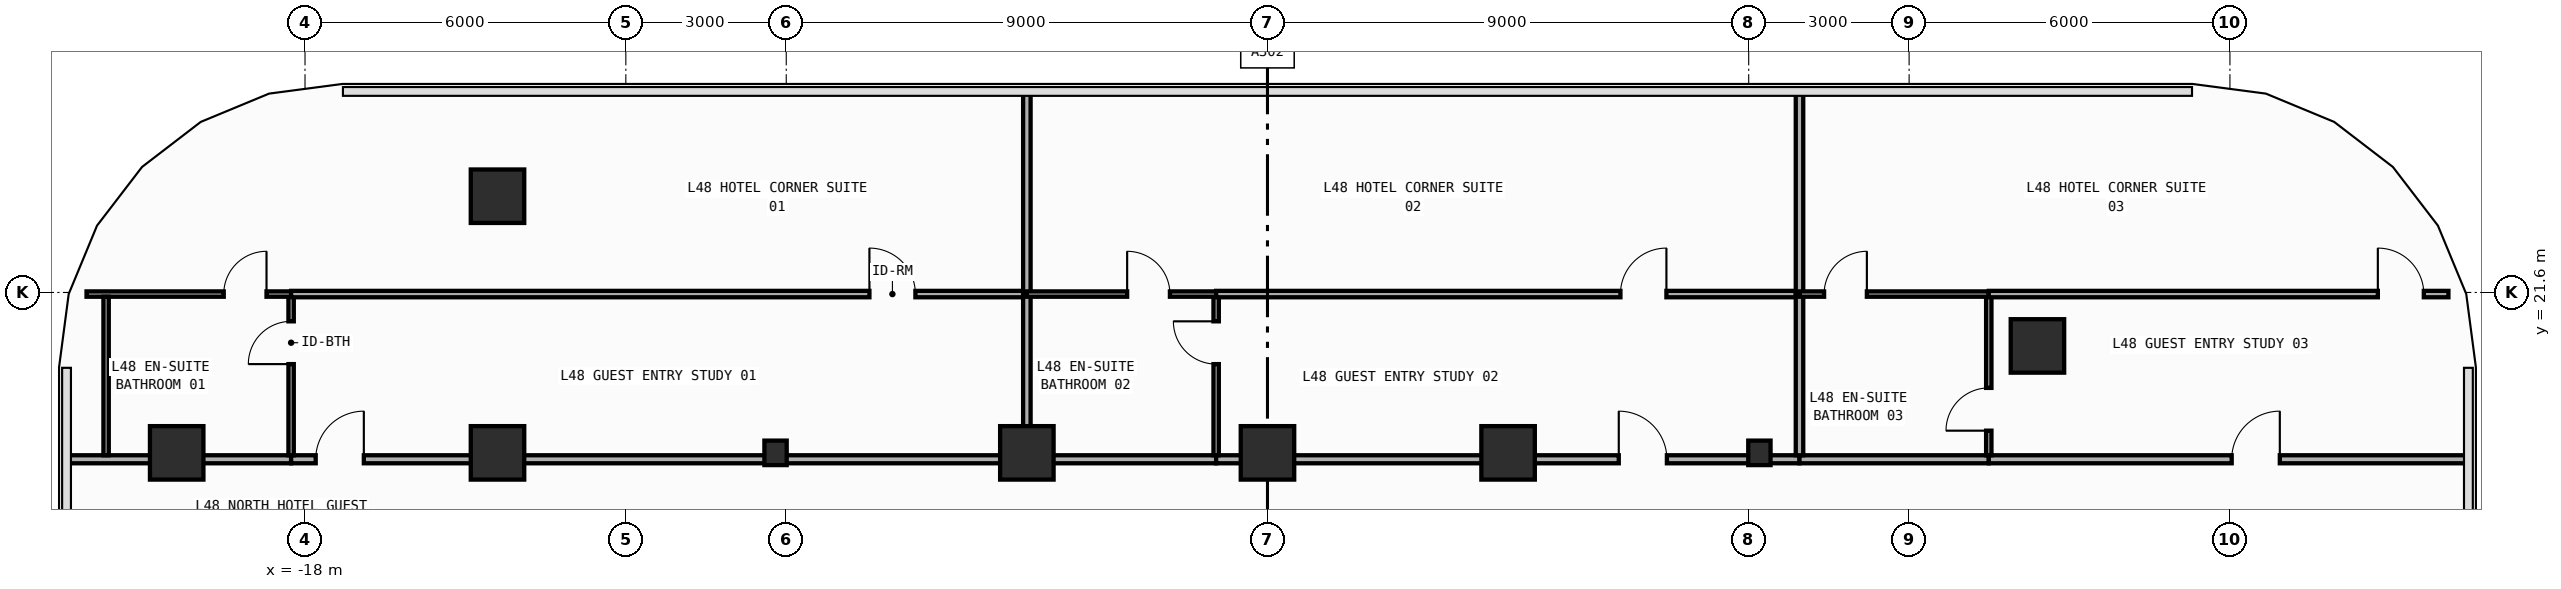
"""IFC4 building model, lengths in metres.
Left out: names, types, materials, properties, quantities, classifications, styles, units other than length and angle.
Written with IfcOpenShell. Run it as: python <this file> out.ifc"""

import sys

from ifc_helpers import new_model, si_unit, direction, frame, frame_2d, origin, origin_2d, place, context, subcontext, project, spatial, rectangle, i_section, extrude, element, fill, save


model = new_model("IFC4")
c1 = context("Model", 3, precision=1e-05, world=origin(), true_north=direction((0.0, 1.0)))
c2 = subcontext(c1, "Body", "Model", "MODEL_VIEW")
j1 = project(units=[si_unit("LENGTHUNIT", "METRE"), si_unit("PLANEANGLEUNIT", "RADIAN")], contexts=[c1])
p1 = place(None, origin())
s1 = spatial("IfcSite", under=j1, at=p1, CompositionType="ELEMENT")
p2 = place(p1, origin())
s2 = spatial("IfcBuilding", under=s1, at=p2, CompositionType="ELEMENT")
p3 = place(p2, frame((0.0, 0.0, 206.8)))
s3 = spatial("IfcBuildingStorey", under=s2, at=p3, CompositionType="ELEMENT", Elevation=206.8)
for number, where, z_axis, x_axis in (
    (1, (-9.2, 18.6, 0.0), (0.0, 0.0, 1.0), (1.0, 0.0, 0.0)),
    (2, (9.2, 18.6, 0.0), (0.0, 0.0, 1.0), (1.0, 0.0, 0.0)),
):
    element("IfcColumn", number, at=place(p3, frame(where, z_axis=z_axis, x_axis=x_axis)), inside=s3, PredefinedType="COLUMN", context=c2, shape_type="SweptSolid", body=[
        extrude(i_section(OverallWidth=0.417, OverallDepth=0.458, WebThickness=0.03, FlangeThickness=0.05, FilletRadius=0.022, at=origin_2d()), origin(), (0.0, 0.0, 1.0), 3.8),
    ])
for number, where, z_axis, x_axis in (
    (3, (-20.4, 18.6, 0.0), (0.0, 0.0, 1.0), (1.0, 0.0, 0.0)),
    (4, (-14.4, 18.6, 0.0), (0.0, 0.0, 1.0), (1.0, 0.0, 0.0)),
    (5, (-4.5, 18.6, 0.0), (0.0, 0.0, 1.0), (1.0, 0.0, 0.0)),
    (6, (0.0, 18.6, 0.0), (0.0, 0.0, 1.0), (1.0, 0.0, 0.0)),
    (7, (4.5, 18.6, 0.0), (0.0, 0.0, 1.0), (1.0, 0.0, 0.0)),
    (8, (-14.4, 23.4, 0.0), (0.0, 0.0, 1.0), (1.0, 0.0, 0.0)),
    (9, (14.4, 20.6, 0.0), (0.0, 0.0, 1.0), (1.0, 0.0, 0.0)),
):
    element("IfcColumn", number, at=place(p3, frame(where, z_axis=z_axis, x_axis=x_axis)), inside=s3, PredefinedType="COLUMN", context=c2, shape_type="SweptSolid", body=[
        extrude(rectangle(XDim=1.0, YDim=1.0, at=origin_2d()), origin(), (0.0, 0.0, 1.0), 3.8),
    ])
p4 = place(p3, frame((-22.455, 18.48, 0.0), z_axis=(0.0, 0.0, 1.0), x_axis=(1.0, 0.0, 0.0)))
e10 = element("IfcWall", 10, at=p4, inside=s3, PredefinedType="PARTITIONING", context=c2, shape_type="SweptSolid", body=[
    extrude(rectangle(XDim=4.195, YDim=0.15, at=frame_2d((2.098, 0.0))), origin(), (0.0, 0.0, 1.0), 2.952),
])
p5 = place(p3, frame((-18.26, 18.48, 0.0), z_axis=(0.0, 0.0, 1.0), x_axis=(1.0, 0.0, 0.0)))
e11 = element("IfcWall", 11, at=p5, inside=s3, PredefinedType="PARTITIONING", context=c2, shape_type="SweptSolid", body=[
    extrude(rectangle(XDim=13.76, YDim=0.15, at=frame_2d((6.88, 0.0))), origin(), (0.0, 0.0, 1.0), 2.952),
])
p6 = place(p5, frame((0.46, 0.0, 0.0)))
e12 = element("IfcOpeningElement", 12, at=p6, cuts=e11, PredefinedType="OPENING", context=c2, shape_type="SweptSolid", body=[
    extrude(rectangle(XDim=0.9, YDim=2.15, at=frame_2d((0.45, 1.075))), frame((0.0, 0.085, 0.0), z_axis=(0.0, -1.0, 0.0), x_axis=(1.0, 0.0, 0.0)), (0.0, 0.0, 1.0), 0.17),
])
p7 = place(p3, frame((-4.5, 18.48, 0.0), z_axis=(0.0, 0.0, 1.0), x_axis=(1.0, 0.0, 0.0)))
e13 = element("IfcWall", 13, at=p7, inside=s3, PredefinedType="PARTITIONING", context=c2, shape_type="SweptSolid", body=[
    extrude(rectangle(XDim=3.54, YDim=0.15, at=frame_2d((1.77, 0.0))), origin(), (0.0, 0.0, 1.0), 2.952),
])
p8 = place(p3, frame((-0.96, 18.48, 0.0), z_axis=(0.0, 0.0, 1.0), x_axis=(1.0, 0.0, 0.0)))
e14 = element("IfcWall", 14, at=p8, inside=s3, PredefinedType="PARTITIONING", context=c2, shape_type="SweptSolid", body=[
    extrude(rectangle(XDim=10.91, YDim=0.15, at=frame_2d((5.455, 0.0))), origin(), (0.0, 0.0, 1.0), 2.952),
])
p9 = place(p8, frame((7.53, 0.0, 0.0)))
e15 = element("IfcOpeningElement", 15, at=p9, cuts=e14, PredefinedType="OPENING", context=c2, shape_type="SweptSolid", body=[
    extrude(rectangle(XDim=0.9, YDim=2.15, at=frame_2d((0.45, 1.075))), frame((0.0, 0.085, 0.0), z_axis=(0.0, -1.0, 0.0), x_axis=(1.0, 0.0, 0.0)), (0.0, 0.0, 1.0), 0.17),
])
p10 = place(p3, frame((9.95, 18.48, 0.0), z_axis=(0.0, 0.0, 1.0), x_axis=(1.0, 0.0, 0.0)))
e16 = element("IfcWall", 16, at=p10, inside=s3, PredefinedType="PARTITIONING", context=c2, shape_type="SweptSolid", body=[
    extrude(rectangle(XDim=3.54, YDim=0.15, at=frame_2d((1.77, 0.0))), origin(), (0.0, 0.0, 1.0), 3.54),
])
p11 = place(p3, frame((13.49, 18.48, 0.0), z_axis=(0.0, 0.0, 1.0), x_axis=(1.0, 0.0, 0.0)))
e17 = element("IfcWall", 17, at=p11, inside=s3, PredefinedType="PARTITIONING", context=c2, shape_type="SweptSolid", body=[
    extrude(rectangle(XDim=8.965, YDim=0.15, at=frame_2d((4.482, 0.0))), origin(), (0.0, 0.0, 1.0), 3.54),
])
p12 = place(p11, frame((4.543, 0.0, 0.0)))
e18 = element("IfcOpeningElement", 18, at=p12, cuts=e17, PredefinedType="OPENING", context=c2, shape_type="SweptSolid", body=[
    extrude(rectangle(XDim=0.9, YDim=2.15, at=frame_2d((0.45, 1.075))), frame((0.0, 0.085, 0.0), z_axis=(0.0, -1.0, 0.0), x_axis=(1.0, 0.0, 0.0)), (0.0, 0.0, 1.0), 0.17),
])
p13 = place(p3, frame((-18.26, 18.555, 0.0), z_axis=(0.0, 0.0, 1.0), x_axis=(0.0, 1.0, 0.0)))
e19 = element("IfcWall", 19, at=p13, inside=s3, PredefinedType="PARTITIONING", context=c2, shape_type="SweptSolid", body=[
    extrude(rectangle(XDim=2.965, YDim=0.1, at=frame_2d((1.482, 0.0))), origin(), (0.0, 0.0, 1.0), 3.54),
])
p14 = place(p13, frame((1.705, 0.0, 0.0)))
e20 = element("IfcOpeningElement", 20, at=p14, cuts=e19, PredefinedType="OPENING", context=c2, shape_type="SweptSolid", body=[
    extrude(rectangle(XDim=0.8, YDim=2.1, at=frame_2d((0.4, 1.05))), frame((0.0, 0.06, 0.0), z_axis=(0.0, -1.0, 0.0), x_axis=(1.0, 0.0, 0.0)), (0.0, 0.0, 1.0), 0.12),
])
p15 = place(p3, frame((-22.086, 21.57, 0.0), z_axis=(0.0, 0.0, 1.0), x_axis=(1.0, 0.0, 0.0)))
e21 = element("IfcWall", 21, at=p15, inside=s3, PredefinedType="PARTITIONING", context=c2, shape_type="SweptSolid", body=[
    extrude(rectangle(XDim=3.826, YDim=0.1, at=frame_2d((1.913, 0.0))), origin(), (0.0, 0.0, 1.0), 3.54),
])
p16 = place(p15, frame((2.566, 0.0, 0.0)))
e22 = element("IfcOpeningElement", 22, at=p16, cuts=e21, PredefinedType="OPENING", context=c2, shape_type="SweptSolid", body=[
    extrude(rectangle(XDim=0.8, YDim=2.1, at=frame_2d((0.4, 1.05))), frame((0.0, 0.06, 0.0), z_axis=(0.0, -1.0, 0.0), x_axis=(1.0, 0.0, 0.0)), (0.0, 0.0, 1.0), 0.12),
])
p17 = place(p3, frame((-18.26, 21.57, 0.0), z_axis=(0.0, 0.0, 1.0), x_axis=(1.0, 0.0, 0.0)))
e23 = element("IfcWall", 23, at=p17, inside=s3, PredefinedType="PARTITIONING", context=c2, shape_type="SweptSolid", body=[
    extrude(rectangle(XDim=13.76, YDim=0.12, at=frame_2d((6.88, 0.0))), origin(), (0.0, 0.0, 1.0), 3.54),
])
p18 = place(p17, frame((10.816, 0.0, 0.0)))
e24 = element("IfcOpeningElement", 24, at=p18, cuts=e23, PredefinedType="OPENING", context=c2, shape_type="SweptSolid", body=[
    extrude(rectangle(XDim=0.86, YDim=2.15, at=frame_2d((0.43, 1.075))), frame((0.0, 0.07, 0.0), z_axis=(0.0, -1.0, 0.0), x_axis=(1.0, 0.0, 0.0)), (0.0, 0.0, 1.0), 0.14),
])
p19 = place(p3, frame((-4.5, 18.555, 0.0), z_axis=(0.0, 0.0, 1.0), x_axis=(0.0, 1.0, 0.0)))
e25 = element("IfcWall", 25, at=p19, inside=s3, PredefinedType="PARTITIONING", context=c2, shape_type="SweptSolid", body=[
    extrude(rectangle(XDim=3.015, YDim=0.14, at=frame_2d((1.508, 0.0))), origin(), (0.0, 0.0, 1.0), 3.54),
])
p20 = place(p3, frame((-4.5, 21.57, 0.0), z_axis=(0.0, 0.0, 1.0), x_axis=(0.0, 1.0, 0.0)))
e26 = element("IfcWall", 26, at=p20, inside=s3, PredefinedType="PARTITIONING", context=c2, shape_type="SweptSolid", body=[
    extrude(rectangle(XDim=3.785, YDim=0.14, at=frame_2d((1.893, 0.0))), origin(), (0.0, 0.0, 1.0), 3.54),
])
p21 = place(p3, frame((-0.96, 18.555, 0.0), z_axis=(0.0, 0.0, 1.0), x_axis=(0.0, 1.0, 0.0)))
e27 = element("IfcWall", 27, at=p21, inside=s3, PredefinedType="PARTITIONING", context=c2, shape_type="SweptSolid", body=[
    extrude(rectangle(XDim=2.965, YDim=0.1, at=frame_2d((1.482, 0.0))), origin(), (0.0, 0.0, 1.0), 3.54),
])
p22 = place(p21, frame((1.705, 0.0, 0.0)))
e28 = element("IfcOpeningElement", 28, at=p22, cuts=e27, PredefinedType="OPENING", context=c2, shape_type="SweptSolid", body=[
    extrude(rectangle(XDim=0.8, YDim=2.1, at=frame_2d((0.4, 1.05))), frame((0.0, 0.06, 0.0), z_axis=(0.0, -1.0, 0.0), x_axis=(1.0, 0.0, 0.0)), (0.0, 0.0, 1.0), 0.12),
])
p23 = place(p3, frame((-4.5, 21.57, 0.0), z_axis=(0.0, 0.0, 1.0), x_axis=(1.0, 0.0, 0.0)))
e29 = element("IfcWall", 29, at=p23, inside=s3, PredefinedType="PARTITIONING", context=c2, shape_type="SweptSolid", body=[
    extrude(rectangle(XDim=3.54, YDim=0.1, at=frame_2d((1.77, 0.0))), origin(), (0.0, 0.0, 1.0), 3.54),
])
p24 = place(p23, frame((1.875, 0.0, 0.0)))
e30 = element("IfcOpeningElement", 30, at=p24, cuts=e29, PredefinedType="OPENING", context=c2, shape_type="SweptSolid", body=[
    extrude(rectangle(XDim=0.8, YDim=2.1, at=frame_2d((0.4, 1.05))), frame((0.0, 0.06, 0.0), z_axis=(0.0, -1.0, 0.0), x_axis=(1.0, 0.0, 0.0)), (0.0, 0.0, 1.0), 0.12),
])
p25 = place(p3, frame((-0.96, 21.57, 0.0), z_axis=(0.0, 0.0, 1.0), x_axis=(1.0, 0.0, 0.0)))
e31 = element("IfcWall", 31, at=p25, inside=s3, PredefinedType="PARTITIONING", context=c2, shape_type="SweptSolid", body=[
    extrude(rectangle(XDim=10.91, YDim=0.12, at=frame_2d((5.455, 0.0))), origin(), (0.0, 0.0, 1.0), 3.54),
])
p26 = place(p25, frame((7.561, 0.0, 0.0)))
e32 = element("IfcOpeningElement", 32, at=p26, cuts=e31, PredefinedType="OPENING", context=c2, shape_type="SweptSolid", body=[
    extrude(rectangle(XDim=0.86, YDim=2.15, at=frame_2d((0.43, 1.075))), frame((0.0, 0.07, 0.0), z_axis=(0.0, -1.0, 0.0), x_axis=(1.0, 0.0, 0.0)), (0.0, 0.0, 1.0), 0.14),
])
p27 = place(p3, frame((9.95, 18.555, 0.0), z_axis=(0.0, 0.0, 1.0), x_axis=(0.0, 1.0, 0.0)))
e33 = element("IfcWall", 33, at=p27, inside=s3, PredefinedType="PARTITIONING", context=c2, shape_type="SweptSolid", body=[
    extrude(rectangle(XDim=3.015, YDim=0.14, at=frame_2d((1.508, 0.0))), origin(), (0.0, 0.0, 1.0), 3.54),
])
p28 = place(p3, frame((9.95, 21.57, 0.0), z_axis=(0.0, 0.0, 1.0), x_axis=(0.0, 1.0, 0.0)))
e34 = element("IfcWall", 34, at=p28, inside=s3, PredefinedType="PARTITIONING", context=c2, shape_type="SweptSolid", body=[
    extrude(rectangle(XDim=3.785, YDim=0.14, at=frame_2d((1.893, 0.0))), origin(), (0.0, 0.0, 1.0), 3.54),
])
p29 = place(p3, frame((13.49, 18.555, 0.0), z_axis=(0.0, 0.0, 1.0), x_axis=(0.0, 1.0, 0.0)))
e35 = element("IfcWall", 35, at=p29, inside=s3, PredefinedType="PARTITIONING", context=c2, shape_type="SweptSolid", body=[
    extrude(rectangle(XDim=2.965, YDim=0.1, at=frame_2d((1.482, 0.0))), origin(), (0.0, 0.0, 1.0), 3.54),
])
p30 = place(p29, frame((0.46, 0.0, 0.0)))
e36 = element("IfcOpeningElement", 36, at=p30, cuts=e35, PredefinedType="OPENING", context=c2, shape_type="SweptSolid", body=[
    extrude(rectangle(XDim=0.8, YDim=2.1, at=frame_2d((0.4, 1.05))), frame((0.0, 0.06, 0.0), z_axis=(0.0, -1.0, 0.0), x_axis=(1.0, 0.0, 0.0)), (0.0, 0.0, 1.0), 0.12),
])
p31 = place(p3, frame((9.95, 21.57, 0.0), z_axis=(0.0, 0.0, 1.0), x_axis=(1.0, 0.0, 0.0)))
e37 = element("IfcWall", 37, at=p31, inside=s3, PredefinedType="PARTITIONING", context=c2, shape_type="SweptSolid", body=[
    extrude(rectangle(XDim=3.54, YDim=0.1, at=frame_2d((1.77, 0.0))), origin(), (0.0, 0.0, 1.0), 3.54),
])
p32 = place(p31, frame((0.46, 0.0, 0.0)))
e38 = element("IfcOpeningElement", 38, at=p32, cuts=e37, PredefinedType="OPENING", context=c2, shape_type="SweptSolid", body=[
    extrude(rectangle(XDim=0.8, YDim=2.1, at=frame_2d((0.4, 1.05))), frame((0.0, 0.06, 0.0), z_axis=(0.0, -1.0, 0.0), x_axis=(1.0, 0.0, 0.0)), (0.0, 0.0, 1.0), 0.12),
])
p33 = place(p3, frame((13.49, 21.57, 0.0), z_axis=(0.0, 0.0, 1.0), x_axis=(1.0, 0.0, 0.0)))
e39 = element("IfcWall", 39, at=p33, inside=s3, PredefinedType="PARTITIONING", context=c2, shape_type="SweptSolid", body=[
    extrude(rectangle(XDim=8.596, YDim=0.12, at=frame_2d((4.298, 0.0))), origin(), (0.0, 0.0, 1.0), 3.54),
])
p34 = place(p33, frame((7.276, 0.0, 0.0)))
e40 = element("IfcOpeningElement", 40, at=p34, cuts=e39, PredefinedType="OPENING", context=c2, shape_type="SweptSolid", body=[
    extrude(rectangle(XDim=0.86, YDim=2.15, at=frame_2d((0.43, 1.075))), frame((0.0, 0.07, 0.0), z_axis=(0.0, -1.0, 0.0), x_axis=(1.0, 0.0, 0.0)), (0.0, 0.0, 1.0), 0.14),
])
p35 = place(p3, frame((-21.72, 18.555, 0.0), z_axis=(0.0, 0.0, 1.0), x_axis=(0.0, 1.0, 0.0)))
e41 = element("IfcWall", 41, at=p35, inside=s3, PredefinedType="PARTITIONING", context=c2, shape_type="SweptSolid", body=[
    extrude(rectangle(XDim=2.965, YDim=0.1, at=frame_2d((1.482, 0.0))), origin(), (0.0, 0.0, 1.0), 3.54),
])
p36 = place(p6, origin())
e42 = element("IfcDoor", 42, at=p36, inside=s3, OperationType="SINGLE_SWING_RIGHT", PredefinedType="DOOR", context=c2, shape_type="SweptSolid", body=[
    extrude(rectangle(XDim=0.9, YDim=2.15, at=frame_2d((0.45, 1.075))), frame((0.0, 0.025, 0.0), z_axis=(0.0, -1.0, 0.0), x_axis=(1.0, 0.0, 0.0)), (0.0, 0.0, 1.0), 0.05),
])
fill(e12, e42)
p37 = place(p9, origin())
e43 = element("IfcDoor", 43, at=p37, inside=s3, OperationType="SINGLE_SWING_LEFT", PredefinedType="DOOR", context=c2, shape_type="SweptSolid", body=[
    extrude(rectangle(XDim=0.9, YDim=2.15, at=frame_2d((0.45, 1.075))), frame((0.0, 0.025, 0.0), z_axis=(0.0, -1.0, 0.0), x_axis=(1.0, 0.0, 0.0)), (0.0, 0.0, 1.0), 0.05),
])
fill(e15, e43)
p38 = place(p12, origin())
e44 = element("IfcDoor", 44, at=p38, inside=s3, OperationType="SINGLE_SWING_RIGHT", PredefinedType="DOOR", context=c2, shape_type="SweptSolid", body=[
    extrude(rectangle(XDim=0.9, YDim=2.15, at=frame_2d((0.45, 1.075))), frame((0.0, 0.025, 0.0), z_axis=(0.0, -1.0, 0.0), x_axis=(1.0, 0.0, 0.0)), (0.0, 0.0, 1.0), 0.05),
])
fill(e18, e44)
p39 = place(p14, origin())
e45 = element("IfcDoor", 45, at=p39, inside=s3, OperationType="SINGLE_SWING_LEFT", PredefinedType="DOOR", context=c2, shape_type="SweptSolid", body=[
    extrude(rectangle(XDim=0.8, YDim=2.1, at=frame_2d((0.4, 1.05))), frame((0.0, 0.025, 0.0), z_axis=(0.0, -1.0, 0.0), x_axis=(1.0, 0.0, 0.0)), (0.0, 0.0, 1.0), 0.05),
])
fill(e20, e45)
p40 = place(p16, origin())
e46 = element("IfcDoor", 46, at=p40, inside=s3, OperationType="SINGLE_SWING_RIGHT", PredefinedType="DOOR", context=c2, shape_type="SweptSolid", body=[
    extrude(rectangle(XDim=0.8, YDim=2.1, at=frame_2d((0.4, 1.05))), frame((0.0, 0.025, 0.0), z_axis=(0.0, -1.0, 0.0), x_axis=(1.0, 0.0, 0.0)), (0.0, 0.0, 1.0), 0.05),
])
fill(e22, e46)
p41 = place(p18, origin())
e47 = element("IfcDoor", 47, at=p41, inside=s3, OperationType="SINGLE_SWING_LEFT", PredefinedType="DOOR", context=c2, shape_type="SweptSolid", body=[
    extrude(rectangle(XDim=0.86, YDim=2.15, at=frame_2d((0.43, 1.075))), frame((0.0, 0.025, 0.0), z_axis=(0.0, -1.0, 0.0), x_axis=(1.0, 0.0, 0.0)), (0.0, 0.0, 1.0), 0.05),
])
fill(e24, e47)
p42 = place(p22, origin())
e48 = element("IfcDoor", 48, at=p42, inside=s3, OperationType="SINGLE_SWING_RIGHT", PredefinedType="DOOR", context=c2, shape_type="SweptSolid", body=[
    extrude(rectangle(XDim=0.8, YDim=2.1, at=frame_2d((0.4, 1.05))), frame((0.0, 0.025, 0.0), z_axis=(0.0, -1.0, 0.0), x_axis=(1.0, 0.0, 0.0)), (0.0, 0.0, 1.0), 0.05),
])
fill(e28, e48)
p43 = place(p24, origin())
e49 = element("IfcDoor", 49, at=p43, inside=s3, OperationType="SINGLE_SWING_LEFT", PredefinedType="DOOR", context=c2, shape_type="SweptSolid", body=[
    extrude(rectangle(XDim=0.8, YDim=2.1, at=frame_2d((0.4, 1.05))), frame((0.0, 0.025, 0.0), z_axis=(0.0, -1.0, 0.0), x_axis=(1.0, 0.0, 0.0)), (0.0, 0.0, 1.0), 0.05),
])
fill(e30, e49)
p44 = place(p26, origin())
e50 = element("IfcDoor", 50, at=p44, inside=s3, OperationType="SINGLE_SWING_RIGHT", PredefinedType="DOOR", context=c2, shape_type="SweptSolid", body=[
    extrude(rectangle(XDim=0.86, YDim=2.15, at=frame_2d((0.43, 1.075))), frame((0.0, 0.025, 0.0), z_axis=(0.0, -1.0, 0.0), x_axis=(1.0, 0.0, 0.0)), (0.0, 0.0, 1.0), 0.05),
])
fill(e32, e50)
p45 = place(p30, origin())
e51 = element("IfcDoor", 51, at=p45, inside=s3, OperationType="SINGLE_SWING_LEFT", PredefinedType="DOOR", context=c2, shape_type="SweptSolid", body=[
    extrude(rectangle(XDim=0.8, YDim=2.1, at=frame_2d((0.4, 1.05))), frame((0.0, 0.025, 0.0), z_axis=(0.0, -1.0, 0.0), x_axis=(1.0, 0.0, 0.0)), (0.0, 0.0, 1.0), 0.05),
])
fill(e36, e51)
p46 = place(p32, origin())
e52 = element("IfcDoor", 52, at=p46, inside=s3, OperationType="SINGLE_SWING_RIGHT", PredefinedType="DOOR", context=c2, shape_type="SweptSolid", body=[
    extrude(rectangle(XDim=0.8, YDim=2.1, at=frame_2d((0.4, 1.05))), frame((0.0, 0.025, 0.0), z_axis=(0.0, -1.0, 0.0), x_axis=(1.0, 0.0, 0.0)), (0.0, 0.0, 1.0), 0.05),
])
fill(e38, e52)
p47 = place(p34, origin())
e53 = element("IfcDoor", 53, at=p47, inside=s3, OperationType="SINGLE_SWING_LEFT", PredefinedType="DOOR", context=c2, shape_type="SweptSolid", body=[
    extrude(rectangle(XDim=0.86, YDim=2.15, at=frame_2d((0.43, 1.075))), frame((0.0, 0.025, 0.0), z_axis=(0.0, -1.0, 0.0), x_axis=(1.0, 0.0, 0.0)), (0.0, 0.0, 1.0), 0.05),
])
fill(e40, e53)
save(model, sys.argv[1])
